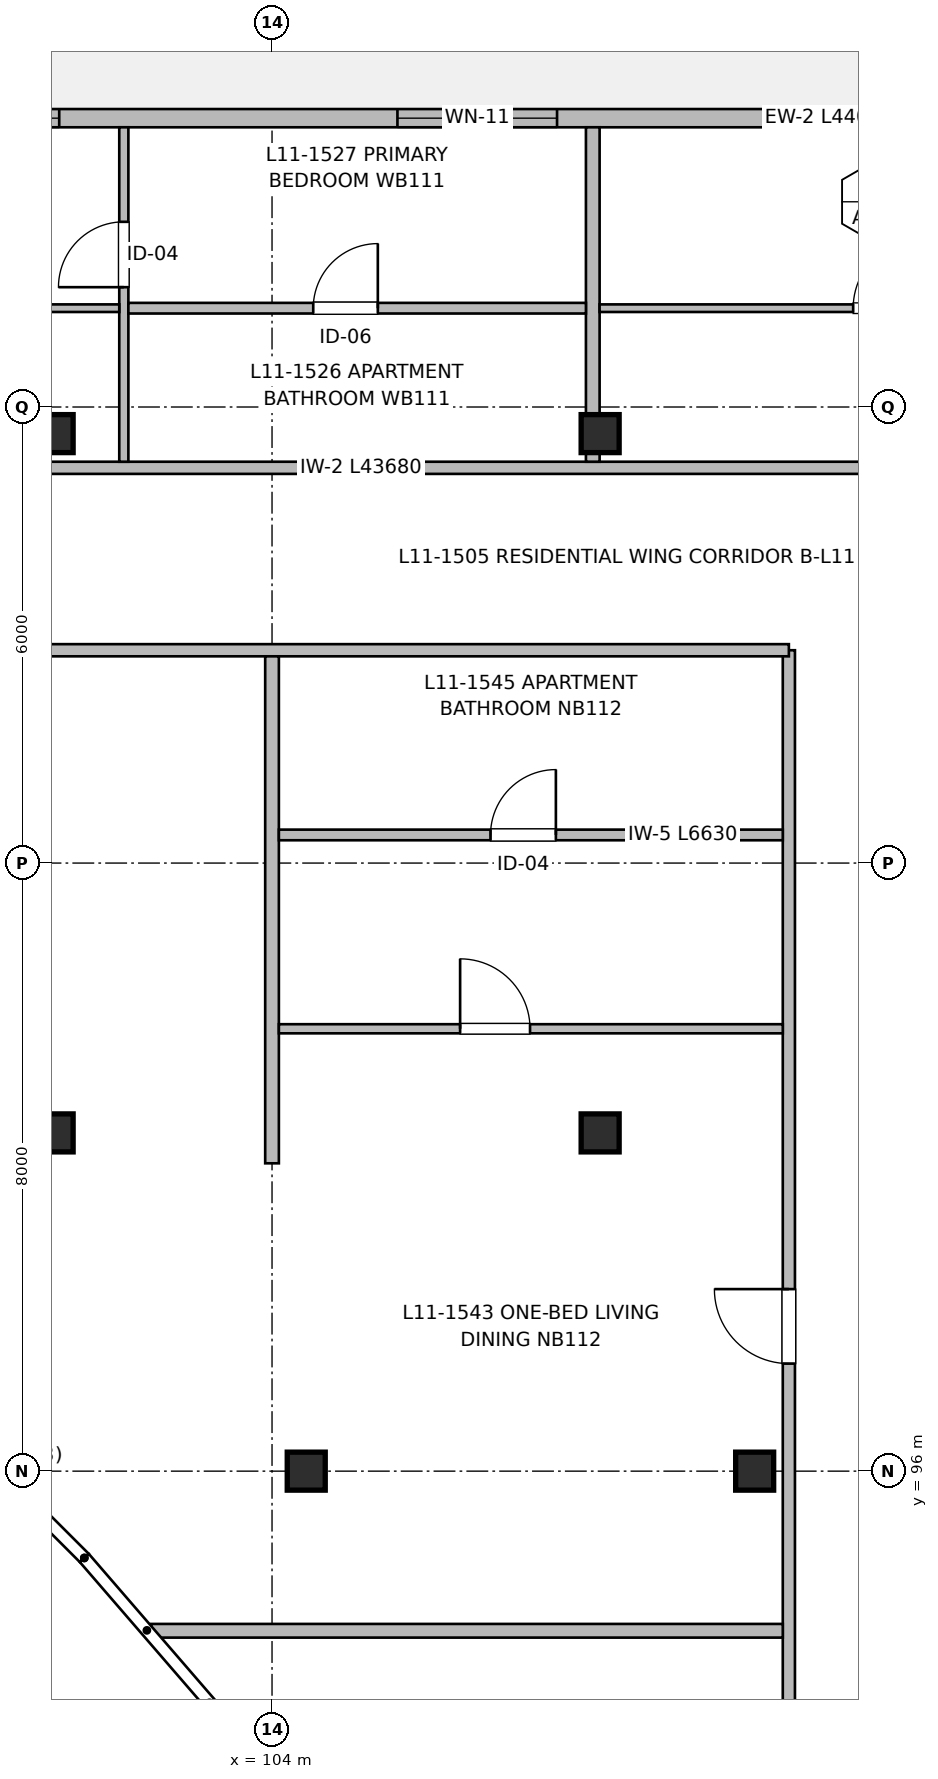
"""IFC4 building model, lengths in metres.
Left out: names, types, materials, properties, quantities, classifications, styles, units other than length and angle.
Written with IfcOpenShell. Run it as: python <this file> out.ifc"""

import sys

from ifc_helpers import new_model, si_unit, direction, frame, frame_2d, origin, origin_2d, place, context, subcontext, project, spatial, rectangle, extrude, element, fill, save


model = new_model("IFC4")
c1 = context("Model", 3, precision=1e-05, world=origin(), true_north=direction((0.0, 1.0)))
c2 = subcontext(c1, "Body", "Model", "MODEL_VIEW")
j1 = project(units=[si_unit("LENGTHUNIT", "METRE"), si_unit("PLANEANGLEUNIT", "RADIAN")], contexts=[c1])
p1 = place(None, origin())
s1 = spatial("IfcSite", under=j1, at=p1, CompositionType="ELEMENT")
p2 = place(p1, origin())
s2 = spatial("IfcBuilding", under=s1, at=p2, CompositionType="ELEMENT")
p3 = place(p2, frame((0.0, 0.0, 36.16)))
s3 = spatial("IfcBuildingStorey", under=s2, at=p3, CompositionType="ELEMENT", Elevation=36.16)
for number, where, z_axis, x_axis in (
    (1, (101.133, 100.45, 0.0), (0.0, 0.0, 1.0), (1.0, 0.0, 0.0)),
    (2, (101.133, 109.65, 0.0), (0.0, 0.0, 1.0), (1.0, 0.0, 0.0)),
    (3, (104.45, 96.0, 0.0), (0.0, 0.0, 1.0), (1.0, 0.0, 0.0)),
    (4, (108.317, 100.45, 0.0), (0.0, 0.0, 1.0), (1.0, 0.0, 0.0)),
    (5, (108.317, 109.65, 0.0), (0.0, 0.0, 1.0), (1.0, 0.0, 0.0)),
    (6, (110.35, 96.0, 0.0), (0.0, 0.0, 1.0), (1.0, 0.0, 0.0)),
):
    element("IfcColumn", number, at=place(p3, frame(where, z_axis=z_axis, x_axis=x_axis)), inside=s3, PredefinedType="COLUMN", context=c2, shape_type="SweptSolid", body=[
        extrude(rectangle(XDim=0.5, YDim=0.5, at=origin_2d()), origin(), (0.0, 0.0, 1.0), 3.2),
    ])
p4 = place(p3, frame((93.5, 113.8, 0.0), z_axis=(0.0, 0.0, 1.0), x_axis=(1.0, 0.0, 0.0)))
e7 = element("IfcWall", 7, at=p4, inside=s3, PredefinedType="SOLIDWALL", context=c2, shape_type="SweptSolid", body=[
    extrude(rectangle(XDim=44.0, YDim=0.24, at=frame_2d((22.0, 0.0))), origin(), (0.0, 0.0, 1.0), 2.98),
])
p5 = place(p4, frame((3.8, 0.0, 0.0)))
e8 = element("IfcOpeningElement", 8, at=p5, cuts=e7, PredefinedType="OPENING", context=c2, shape_type="SweptSolid", body=[
    extrude(rectangle(XDim=1.2, YDim=2.2, at=frame_2d((0.6, 1.1))), frame((0.0, 0.13, 0.0), z_axis=(0.0, -1.0, 0.0), x_axis=(1.0, 0.0, 0.0)), (0.0, 0.0, 1.0), 0.26),
])
p6 = place(p4, frame((5.7, 0.0, 0.72)))
e9 = element("IfcOpeningElement", 9, at=p6, cuts=e7, PredefinedType="OPENING", context=c2, shape_type="SweptSolid", body=[
    extrude(rectangle(XDim=2.0, YDim=1.5, at=frame_2d((1.0, 0.75))), frame((0.0, 0.13, 0.0), z_axis=(0.0, -1.0, 0.0), x_axis=(1.0, 0.0, 0.0)), (0.0, 0.0, 1.0), 0.26),
])
p7 = place(p4, frame((12.15, 0.0, 0.67)))
e10 = element("IfcOpeningElement", 10, at=p7, cuts=e7, PredefinedType="OPENING", context=c2, shape_type="SweptSolid", body=[
    extrude(rectangle(XDim=2.1, YDim=1.55, at=frame_2d((1.05, 0.775))), frame((0.0, 0.13, 0.0), z_axis=(0.0, -1.0, 0.0), x_axis=(1.0, 0.0, 0.0)), (0.0, 0.0, 1.0), 0.26),
])
p8 = place(p4, frame((21.4, 0.0, 0.0)))
e11 = element("IfcOpeningElement", 11, at=p8, cuts=e7, PredefinedType="OPENING", context=c2, shape_type="SweptSolid", body=[
    extrude(rectangle(XDim=1.2, YDim=2.2, at=frame_2d((0.6, 1.1))), frame((0.0, 0.13, 0.0), z_axis=(0.0, -1.0, 0.0), x_axis=(1.0, 0.0, 0.0)), (0.0, 0.0, 1.0), 0.26),
])
p9 = place(p4, frame((23.3, 0.0, 0.77)))
e12 = element("IfcOpeningElement", 12, at=p9, cuts=e7, PredefinedType="OPENING", context=c2, shape_type="SweptSolid", body=[
    extrude(rectangle(XDim=1.6, YDim=1.45, at=frame_2d((0.8, 0.725))), frame((0.0, 0.13, 0.0), z_axis=(0.0, -1.0, 0.0), x_axis=(1.0, 0.0, 0.0)), (0.0, 0.0, 1.0), 0.26),
])
p10 = place(p4, frame((30.275, 0.0, 0.9)))
e13 = element("IfcOpeningElement", 13, at=p10, cuts=e7, PredefinedType="OPENING", context=c2, shape_type="SweptSolid", body=[
    extrude(rectangle(XDim=1.05, YDim=1.15, at=frame_2d((0.525, 0.575))), frame((0.0, 0.13, 0.0), z_axis=(0.0, -1.0, 0.0), x_axis=(1.0, 0.0, 0.0)), (0.0, 0.0, 1.0), 0.26),
])
p11 = place(p4, frame((39.0, 0.0, 0.0)))
e14 = element("IfcOpeningElement", 14, at=p11, cuts=e7, PredefinedType="OPENING", context=c2, shape_type="SweptSolid", body=[
    extrude(rectangle(XDim=1.2, YDim=2.2, at=frame_2d((0.6, 1.1))), frame((0.0, 0.13, 0.0), z_axis=(0.0, -1.0, 0.0), x_axis=(1.0, 0.0, 0.0)), (0.0, 0.0, 1.0), 0.26),
])
p12 = place(p4, frame((40.9, 0.0, 0.82)))
e15 = element("IfcOpeningElement", 15, at=p12, cuts=e7, PredefinedType="OPENING", context=c2, shape_type="SweptSolid", body=[
    extrude(rectangle(XDim=1.5, YDim=1.4, at=frame_2d((0.75, 0.7))), frame((0.0, 0.13, 0.0), z_axis=(0.0, -1.0, 0.0), x_axis=(1.0, 0.0, 0.0)), (0.0, 0.0, 1.0), 0.26),
])
p13 = place(p3, frame((110.8, 64.56, 0.0), z_axis=(0.0, 0.0, 1.0), x_axis=(0.0, 1.0, 0.0)))
e16 = element("IfcWall", 16, at=p13, inside=s3, PredefinedType="PARTITIONING", context=c2, shape_type="SweptSolid", body=[
    extrude(rectangle(XDim=42.24, YDim=0.16, at=frame_2d((21.12, 0.0))), origin(), (0.0, 0.0, 1.0), 2.935),
])
p14 = place(p13, frame((4.44, 0.0, 0.0)))
e17 = element("IfcOpeningElement", 17, at=p14, cuts=e16, PredefinedType="OPENING", context=c2, shape_type="SweptSolid", body=[
    extrude(rectangle(XDim=1.1, YDim=2.15, at=frame_2d((0.55, 1.075))), frame((0.0, 0.09, 0.0), z_axis=(0.0, -1.0, 0.0), x_axis=(1.0, 0.0, 0.0)), (0.0, 0.0, 1.0), 0.18),
])
p15 = place(p13, frame((10.84, 0.0, 0.0)))
e18 = element("IfcOpeningElement", 18, at=p15, cuts=e16, PredefinedType="OPENING", context=c2, shape_type="SweptSolid", body=[
    extrude(rectangle(XDim=1.6, YDim=2.15, at=frame_2d((0.8, 1.075))), frame((0.0, 0.09, 0.0), z_axis=(0.0, -1.0, 0.0), x_axis=(1.0, 0.0, 0.0)), (0.0, 0.0, 1.0), 0.18),
])
p16 = place(p13, frame((24.245, 0.0, 0.0)))
e19 = element("IfcOpeningElement", 19, at=p16, cuts=e16, PredefinedType="OPENING", context=c2, shape_type="SweptSolid", body=[
    extrude(rectangle(XDim=0.98, YDim=2.15, at=frame_2d((0.49, 1.075))), frame((0.0, 0.09, 0.0), z_axis=(0.0, -1.0, 0.0), x_axis=(1.0, 0.0, 0.0)), (0.0, 0.0, 1.0), 0.18),
])
p17 = place(p13, frame((32.855, 0.0, 0.0)))
e20 = element("IfcOpeningElement", 20, at=p17, cuts=e16, PredefinedType="OPENING", context=c2, shape_type="SweptSolid", body=[
    extrude(rectangle(XDim=0.98, YDim=2.15, at=frame_2d((0.49, 1.075))), frame((0.0, 0.09, 0.0), z_axis=(0.0, -1.0, 0.0), x_axis=(1.0, 0.0, 0.0)), (0.0, 0.0, 1.0), 0.18),
])
p18 = place(p3, frame((93.66, 106.8, 0.0), z_axis=(0.0, 0.0, 1.0), x_axis=(1.0, 0.0, 0.0)))
e21 = element("IfcWall", 21, at=p18, inside=s3, PredefinedType="PARTITIONING", context=c2, shape_type="SweptSolid", body=[
    extrude(rectangle(XDim=17.14, YDim=0.16, at=frame_2d((8.57, 0.0))), origin(), (0.0, 0.0, 1.0), 2.935),
])
p19 = place(p3, frame((93.66, 109.2, 0.0), z_axis=(0.0, 0.0, 1.0), x_axis=(1.0, 0.0, 0.0)))
e22 = element("IfcWall", 22, at=p19, inside=s3, PredefinedType="PARTITIONING", context=c2, shape_type="SweptSolid", body=[
    extrude(rectangle(XDim=43.68, YDim=0.16, at=frame_2d((21.84, 0.0))), origin(), (0.0, 0.0, 1.0), 2.935),
])
p20 = place(p19, frame((3.705, 0.0, 0.0)))
e23 = element("IfcOpeningElement", 23, at=p20, cuts=e22, PredefinedType="OPENING", context=c2, shape_type="SweptSolid", body=[
    extrude(rectangle(XDim=0.98, YDim=2.15, at=frame_2d((0.49, 1.075))), frame((0.0, 0.09, 0.0), z_axis=(0.0, -1.0, 0.0), x_axis=(1.0, 0.0, 0.0)), (0.0, 0.0, 1.0), 0.18),
])
p21 = place(p19, frame((18.33, 0.0, 0.0)))
e24 = element("IfcOpeningElement", 24, at=p21, cuts=e22, PredefinedType="OPENING", context=c2, shape_type="SweptSolid", body=[
    extrude(rectangle(XDim=0.98, YDim=2.15, at=frame_2d((0.49, 1.075))), frame((0.0, 0.09, 0.0), z_axis=(0.0, -1.0, 0.0), x_axis=(1.0, 0.0, 0.0)), (0.0, 0.0, 1.0), 0.18),
])
p22 = place(p19, frame((32.915, 0.0, 0.0)))
e25 = element("IfcOpeningElement", 25, at=p22, cuts=e22, PredefinedType="OPENING", context=c2, shape_type="SweptSolid", body=[
    extrude(rectangle(XDim=0.98, YDim=2.15, at=frame_2d((0.49, 1.075))), frame((0.0, 0.09, 0.0), z_axis=(0.0, -1.0, 0.0), x_axis=(1.0, 0.0, 0.0)), (0.0, 0.0, 1.0), 0.18),
])
p23 = place(p3, frame((104.0, 100.05, 0.0), z_axis=(0.0, 0.0, 1.0), x_axis=(0.0, 1.0, 0.0)))
e26 = element("IfcWall", 26, at=p23, inside=s3, PredefinedType="PARTITIONING", context=c2, shape_type="SweptSolid", body=[
    extrude(rectangle(XDim=6.67, YDim=0.18, at=frame_2d((3.335, 0.0))), origin(), (0.0, 0.0, 1.0), 2.935),
])
p24 = place(p3, frame((108.22, 109.28, 0.0), z_axis=(0.0, 0.0, 1.0), x_axis=(0.0, 1.0, 0.0)))
e27 = element("IfcWall", 27, at=p24, inside=s3, PredefinedType="PARTITIONING", context=c2, shape_type="SweptSolid", body=[
    extrude(rectangle(XDim=4.4, YDim=0.18, at=frame_2d((2.2, 0.0))), origin(), (0.0, 0.0, 1.0), 2.935),
])
p25 = place(p3, frame((102.05, 109.28, 0.0), z_axis=(0.0, 0.0, 1.0), x_axis=(0.0, 1.0, 0.0)))
e28 = element("IfcWall", 28, at=p25, inside=s3, PredefinedType="PARTITIONING", context=c2, shape_type="SweptSolid", body=[
    extrude(rectangle(XDim=4.4, YDim=0.12, at=frame_2d((2.2, 0.0))), origin(), (0.0, 0.0, 1.0), 2.935),
])
p26 = place(p25, frame((2.296, 0.0, 0.0)))
e29 = element("IfcOpeningElement", 29, at=p26, cuts=e28, PredefinedType="OPENING", context=c2, shape_type="SweptSolid", body=[
    extrude(rectangle(XDim=0.86, YDim=2.1, at=frame_2d((0.43, 1.05))), frame((0.0, 0.07, 0.0), z_axis=(0.0, -1.0, 0.0), x_axis=(1.0, 0.0, 0.0)), (0.0, 0.0, 1.0), 0.14),
])
p27 = place(p3, frame((102.11, 111.3, 0.0), z_axis=(0.0, 0.0, 1.0), x_axis=(1.0, 0.0, 0.0)))
e30 = element("IfcWall", 30, at=p27, inside=s3, PredefinedType="PARTITIONING", context=c2, shape_type="SweptSolid", body=[
    extrude(rectangle(XDim=6.02, YDim=0.14, at=frame_2d((3.01, 0.0))), origin(), (0.0, 0.0, 1.0), 2.935),
])
p28 = place(p27, frame((2.432, 0.0, 0.0)))
e31 = element("IfcOpeningElement", 31, at=p28, cuts=e30, PredefinedType="OPENING", context=c2, shape_type="SweptSolid", body=[
    extrude(rectangle(XDim=0.85, YDim=2.05, at=frame_2d((0.425, 1.025))), frame((0.0, 0.08, 0.0), z_axis=(0.0, -1.0, 0.0), x_axis=(1.0, 0.0, 0.0)), (0.0, 0.0, 1.0), 0.16),
])
p29 = place(p3, frame((93.66, 111.3, 0.0), z_axis=(0.0, 0.0, 1.0), x_axis=(1.0, 0.0, 0.0)))
e32 = element("IfcWall", 32, at=p29, inside=s3, PredefinedType="PARTITIONING", context=c2, shape_type="SweptSolid", body=[
    extrude(rectangle(XDim=8.33, YDim=0.1, at=frame_2d((4.165, 0.0))), origin(), (0.0, 0.0, 1.0), 2.935),
])
p30 = place(p29, frame((3.356, 0.0, 0.0)))
e33 = element("IfcOpeningElement", 33, at=p30, cuts=e32, PredefinedType="OPENING", context=c2, shape_type="SweptSolid", body=[
    extrude(rectangle(XDim=0.92, YDim=2.1, at=frame_2d((0.46, 1.05))), frame((0.0, 0.06, 0.0), z_axis=(0.0, -1.0, 0.0), x_axis=(1.0, 0.0, 0.0)), (0.0, 0.0, 1.0), 0.12),
])
p31 = place(p3, frame((108.31, 111.3, 0.0), z_axis=(0.0, 0.0, 1.0), x_axis=(1.0, 0.0, 0.0)))
e34 = element("IfcWall", 34, at=p31, inside=s3, PredefinedType="PARTITIONING", context=c2, shape_type="SweptSolid", body=[
    extrude(rectangle(XDim=8.28, YDim=0.1, at=frame_2d((4.14, 0.0))), origin(), (0.0, 0.0, 1.0), 2.935),
])
p32 = place(p31, frame((3.336, 0.0, 0.0)))
e35 = element("IfcOpeningElement", 35, at=p32, cuts=e34, PredefinedType="OPENING", context=c2, shape_type="SweptSolid", body=[
    extrude(rectangle(XDim=0.92, YDim=2.1, at=frame_2d((0.46, 1.05))), frame((0.0, 0.06, 0.0), z_axis=(0.0, -1.0, 0.0), x_axis=(1.0, 0.0, 0.0)), (0.0, 0.0, 1.0), 0.12),
])
p33 = place(p3, frame((102.411, 93.9, 0.0), z_axis=(0.0, 0.0, 1.0), x_axis=(1.0, 0.0, 0.0)))
e36 = element("IfcWall", 36, at=p33, inside=s3, PredefinedType="PARTITIONING", context=c2, shape_type="SweptSolid", body=[
    extrude(rectangle(XDim=8.309, YDim=0.18, at=frame_2d((4.155, 0.0))), origin(), (0.0, 0.0, 1.0), 2.935),
])
p34 = place(p3, frame((104.09, 101.82, 0.0), z_axis=(0.0, 0.0, 1.0), x_axis=(1.0, 0.0, 0.0)))
e37 = element("IfcWall", 37, at=p34, inside=s3, PredefinedType="PARTITIONING", context=c2, shape_type="SweptSolid", body=[
    extrude(rectangle(XDim=6.63, YDim=0.12, at=frame_2d((3.315, 0.0))), origin(), (0.0, 0.0, 1.0), 2.935),
])
p35 = place(p34, frame((2.385, 0.0, 0.0)))
e38 = element("IfcOpeningElement", 38, at=p35, cuts=e37, PredefinedType="OPENING", context=c2, shape_type="SweptSolid", body=[
    extrude(rectangle(XDim=0.92, YDim=2.1, at=frame_2d((0.46, 1.05))), frame((0.0, 0.07, 0.0), z_axis=(0.0, -1.0, 0.0), x_axis=(1.0, 0.0, 0.0)), (0.0, 0.0, 1.0), 0.14),
])
p36 = place(p3, frame((104.09, 104.37, 0.0), z_axis=(0.0, 0.0, 1.0), x_axis=(1.0, 0.0, 0.0)))
e39 = element("IfcWall", 39, at=p36, inside=s3, PredefinedType="PARTITIONING", context=c2, shape_type="SweptSolid", body=[
    extrude(rectangle(XDim=6.63, YDim=0.14, at=frame_2d((3.315, 0.0))), origin(), (0.0, 0.0, 1.0), 2.935),
])
p37 = place(p36, frame((2.785, 0.0, 0.0)))
e40 = element("IfcOpeningElement", 40, at=p37, cuts=e39, PredefinedType="OPENING", context=c2, shape_type="SweptSolid", body=[
    extrude(rectangle(XDim=0.86, YDim=2.1, at=frame_2d((0.43, 1.05))), frame((0.0, 0.08, 0.0), z_axis=(0.0, -1.0, 0.0), x_axis=(1.0, 0.0, 0.0)), (0.0, 0.0, 1.0), 0.16),
])
p38 = place(p6, origin())
e41 = element("IfcWindow", 41, at=p38, inside=s3, PartitioningType="SINGLE_PANEL", PredefinedType="WINDOW", context=c2, shape_type="SweptSolid", body=[
    extrude(rectangle(XDim=2.0, YDim=1.5, at=frame_2d((1.0, 0.75))), frame((0.0, 0.03, 0.0), z_axis=(0.0, -1.0, 0.0), x_axis=(1.0, 0.0, 0.0)), (0.0, 0.0, 1.0), 0.06),
])
fill(e9, e41)
p39 = place(p7, origin())
e42 = element("IfcWindow", 42, at=p39, inside=s3, PartitioningType="SINGLE_PANEL", PredefinedType="WINDOW", context=c2, shape_type="SweptSolid", body=[
    extrude(rectangle(XDim=2.1, YDim=1.55, at=frame_2d((1.05, 0.775))), frame((0.0, 0.03, 0.0), z_axis=(0.0, -1.0, 0.0), x_axis=(1.0, 0.0, 0.0)), (0.0, 0.0, 1.0), 0.06),
])
fill(e10, e42)
p40 = place(p26, origin())
e43 = element("IfcDoor", 43, at=p40, inside=s3, OperationType="SINGLE_SWING_LEFT", PredefinedType="DOOR", context=c2, shape_type="SweptSolid", body=[
    extrude(rectangle(XDim=0.86, YDim=2.1, at=frame_2d((0.43, 1.05))), frame((0.0, 0.025, 0.0), z_axis=(0.0, -1.0, 0.0), x_axis=(1.0, 0.0, 0.0)), (0.0, 0.0, 1.0), 0.05),
])
fill(e29, e43)
p41 = place(p28, origin())
e44 = element("IfcDoor", 44, at=p41, inside=s3, OperationType="SINGLE_SWING_RIGHT", PredefinedType="DOOR", context=c2, shape_type="SweptSolid", body=[
    extrude(rectangle(XDim=0.85, YDim=2.05, at=frame_2d((0.425, 1.025))), frame((0.0, 0.025, 0.0), z_axis=(0.0, -1.0, 0.0), x_axis=(1.0, 0.0, 0.0)), (0.0, 0.0, 1.0), 0.05),
])
fill(e31, e44)
p42 = place(p32, origin())
e45 = element("IfcDoor", 45, at=p42, inside=s3, OperationType="SINGLE_SWING_RIGHT", PredefinedType="DOOR", context=c2, shape_type="SweptSolid", body=[
    extrude(rectangle(XDim=0.92, YDim=2.1, at=frame_2d((0.46, 1.05))), frame((0.0, 0.025, 0.0), z_axis=(0.0, -1.0, 0.0), x_axis=(1.0, 0.0, 0.0)), (0.0, 0.0, 1.0), 0.05),
])
fill(e35, e45)
p43 = place(p37, origin())
e46 = element("IfcDoor", 46, at=p43, inside=s3, OperationType="SINGLE_SWING_RIGHT", PredefinedType="DOOR", context=c2, shape_type="SweptSolid", body=[
    extrude(rectangle(XDim=0.86, YDim=2.1, at=frame_2d((0.43, 1.05))), frame((0.0, 0.025, 0.0), z_axis=(0.0, -1.0, 0.0), x_axis=(1.0, 0.0, 0.0)), (0.0, 0.0, 1.0), 0.05),
])
fill(e40, e46)
p44 = place(p35, origin())
e47 = element("IfcDoor", 47, at=p44, inside=s3, OperationType="SINGLE_SWING_LEFT", PredefinedType="DOOR", context=c2, shape_type="SweptSolid", body=[
    extrude(rectangle(XDim=0.92, YDim=2.1, at=frame_2d((0.46, 1.05))), frame((0.0, 0.025, 0.0), z_axis=(0.0, -1.0, 0.0), x_axis=(1.0, 0.0, 0.0)), (0.0, 0.0, 1.0), 0.05),
])
fill(e38, e47)
p45 = place(p17, origin())
e48 = element("IfcDoor", 48, at=p45, inside=s3, OperationType="SINGLE_SWING_RIGHT", PredefinedType="DOOR", context=c2, shape_type="SweptSolid", body=[
    extrude(rectangle(XDim=0.98, YDim=2.15, at=frame_2d((0.49, 1.075))), frame((0.0, 0.025, 0.0), z_axis=(0.0, -1.0, 0.0), x_axis=(1.0, 0.0, 0.0)), (0.0, 0.0, 1.0), 0.05),
])
fill(e20, e48)
save(model, sys.argv[1])
